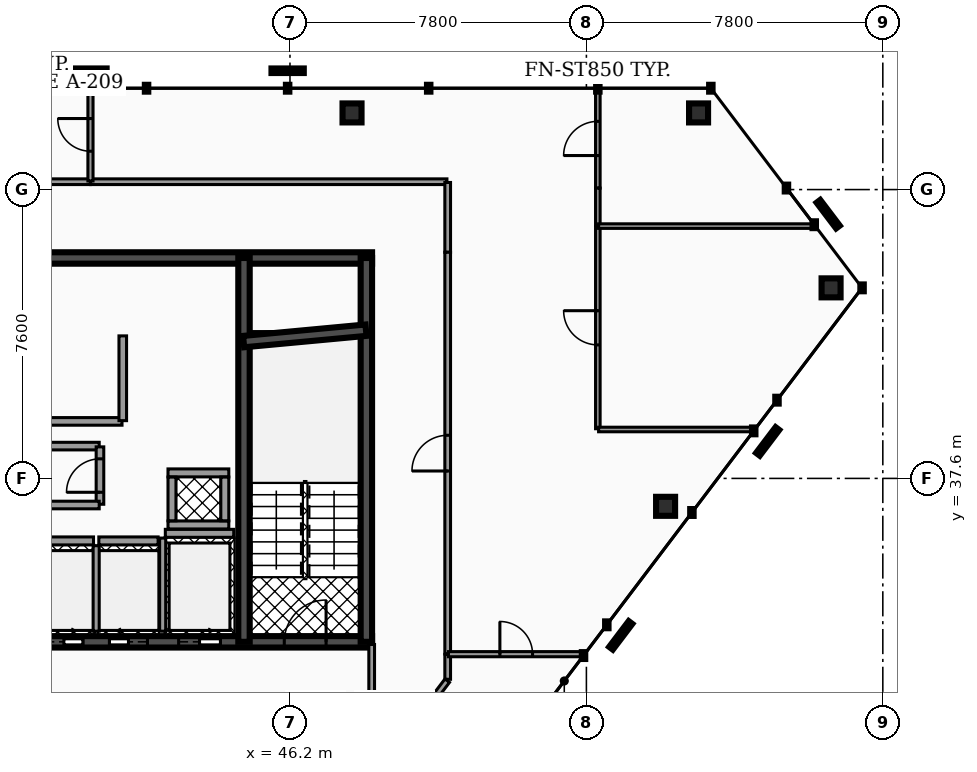
"""IFC4 building model, lengths in metres.
Left out: names, types, materials, properties, quantities, classifications, styles, units other than length and angle.
Written with IfcOpenShell. Run it as: python <this file> out.ifc"""

import sys

from ifc_helpers import new_model, si_unit, direction, frame, frame_2d, origin, origin_2d, place, context, subcontext, project, spatial, rectangle, hollow_rectangle, extrude, element, fill, save


model = new_model("IFC4")
c1 = context("Model", 3, precision=1e-05, world=origin(), true_north=direction((0.0, 1.0)))
c2 = subcontext(c1, "Body", "Model", "MODEL_VIEW")
j1 = project(units=[si_unit("LENGTHUNIT", "METRE"), si_unit("PLANEANGLEUNIT", "RADIAN")], contexts=[c1])
p1 = place(None, origin())
s1 = spatial("IfcSite", under=j1, at=p1, CompositionType="ELEMENT")
p2 = place(p1, origin())
s2 = spatial("IfcBuilding", under=s1, at=p2, CompositionType="ELEMENT")
p3 = place(p2, frame((0.0, 0.0, 265.2)))
s3 = spatial("IfcBuildingStorey", under=s2, at=p3, CompositionType="ELEMENT", Elevation=265.2)
p4 = place(p3, frame((28.5, 43.4, 0.0), z_axis=(0.0, 0.0, 1.0), x_axis=(1.0, 0.0, 0.0)))
e1 = element("IfcWall", 1, at=p4, inside=s3, PredefinedType="SHEAR", context=c2, shape_type="SweptSolid", body=[
    extrude(rectangle(XDim=19.86, YDim=0.3, at=frame_2d((9.93, 0.0))), origin(), (0.0, 0.0, 1.0), 3.18),
])
p5 = place(p3, frame((28.5, 33.3, 0.0), z_axis=(0.0, 0.0, 1.0), x_axis=(1.0, 0.0, 0.0)))
e2 = element("IfcWall", 2, at=p5, inside=s3, PredefinedType="SHEAR", context=c2, shape_type="SweptSolid", body=[
    extrude(rectangle(XDim=19.86, YDim=0.3, at=frame_2d((9.93, 0.0))), origin(), (0.0, 0.0, 1.0), 3.18),
])
p6 = place(p5, frame((3.93, 0.0, 0.0)))
e3 = element("IfcOpeningElement", 3, at=p6, cuts=e2, PredefinedType="OPENING", context=c2, shape_type="SweptSolid", body=[
    extrude(rectangle(XDim=1.1, YDim=2.15, at=frame_2d((0.55, 1.075))), frame((0.0, 0.16, 0.0), z_axis=(0.0, -1.0, 0.0), x_axis=(1.0, 0.0, 0.0)), (0.0, 0.0, 1.0), 0.32),
])
p7 = place(p5, frame((14.77, 0.0, 0.0)))
e4 = element("IfcOpeningElement", 4, at=p7, cuts=e2, PredefinedType="OPENING", context=c2, shape_type="SweptSolid", body=[
    extrude(rectangle(XDim=1.1, YDim=2.15, at=frame_2d((0.55, 1.075))), frame((0.0, 0.16, 0.0), z_axis=(0.0, -1.0, 0.0), x_axis=(1.0, 0.0, 0.0)), (0.0, 0.0, 1.0), 0.32),
])
p8 = place(p5, frame((11.25, 0.0, 0.0)))
e5 = element("IfcOpeningElement", 5, at=p8, cuts=e2, PredefinedType="OPENING", context=c2, shape_type="SweptSolid", body=[
    extrude(rectangle(XDim=1.0, YDim=2.1, at=frame_2d((0.5, 1.05))), frame((0.0, 0.16, 0.0), z_axis=(0.0, -1.0, 0.0), x_axis=(1.0, 0.0, 0.0)), (0.0, 0.0, 1.0), 0.32),
])
p9 = place(p5, frame((12.95, 0.0, 0.0)))
e6 = element("IfcOpeningElement", 6, at=p9, cuts=e2, PredefinedType="OPENING", context=c2, shape_type="SweptSolid", body=[
    extrude(rectangle(XDim=1.0, YDim=2.1, at=frame_2d((0.5, 1.05))), frame((0.0, 0.16, 0.0), z_axis=(0.0, -1.0, 0.0), x_axis=(1.0, 0.0, 0.0)), (0.0, 0.0, 1.0), 0.32),
])
p10 = place(p5, frame((5.85, 0.0, 0.0)))
e7 = element("IfcOpeningElement", 7, at=p10, cuts=e2, PredefinedType="OPENING", context=c2, shape_type="SweptSolid", body=[
    extrude(rectangle(XDim=1.0, YDim=2.1, at=frame_2d((0.5, 1.05))), frame((0.0, 0.16, 0.0), z_axis=(0.0, -1.0, 0.0), x_axis=(1.0, 0.0, 0.0)), (0.0, 0.0, 1.0), 0.32),
])
p11 = place(p5, frame((1.21, 0.0, 0.0)))
e8 = element("IfcOpeningElement", 8, at=p11, cuts=e2, PredefinedType="OPENING", context=c2, shape_type="SweptSolid", body=[
    extrude(rectangle(XDim=1.1, YDim=2.2, at=frame_2d((0.55, 1.1))), frame((0.0, 0.16, 0.0), z_axis=(0.0, -1.0, 0.0), x_axis=(1.0, 0.0, 0.0)), (0.0, 0.0, 1.0), 0.32),
])
p12 = place(p5, frame((9.34, 0.0, 0.0)))
e9 = element("IfcOpeningElement", 9, at=p12, cuts=e2, PredefinedType="OPENING", context=c2, shape_type="SweptSolid", body=[
    extrude(rectangle(XDim=1.12, YDim=2.05, at=frame_2d((0.56, 1.025))), frame((0.0, 0.16, 0.0), z_axis=(0.0, -1.0, 0.0), x_axis=(1.0, 0.0, 0.0)), (0.0, 0.0, 1.0), 0.32),
])
p13 = place(p5, frame((17.55, 0.0, 0.0)))
e10 = element("IfcOpeningElement", 10, at=p13, cuts=e2, PredefinedType="OPENING", context=c2, shape_type="SweptSolid", body=[
    extrude(rectangle(XDim=1.1, YDim=2.2, at=frame_2d((0.55, 1.1))), frame((0.0, 0.16, 0.0), z_axis=(0.0, -1.0, 0.0), x_axis=(1.0, 0.0, 0.0)), (0.0, 0.0, 1.0), 0.32),
])
for number, where, z_axis, x_axis in (
    (11, (44.99, 33.3, 0.0), (0.0, 0.0, 1.0), (0.0, 1.0, 0.0)),
    (12, (48.21, 33.3, 0.0), (0.0, 0.0, 1.0), (0.0, 1.0, 0.0)),
):
    element("IfcWall", number, at=place(p3, frame(where, z_axis=z_axis, x_axis=x_axis)), inside=s3, PredefinedType="SHEAR", context=c2, shape_type="SweptSolid", body=[
        extrude(rectangle(XDim=10.1, YDim=0.3, at=frame_2d((5.05, 0.0))), origin(), (0.0, 0.0, 1.0), 3.18),
    ])
p14 = place(p3, frame((44.98, 41.2, 0.0), z_axis=(0.0, 0.0, 1.0), x_axis=(0.995686468965, 0.09278176286, 0.0)))
e13 = element("IfcWall", 13, at=p14, inside=s3, PredefinedType="SHEAR", context=c2, shape_type="SweptSolid", body=[
    extrude(rectangle(XDim=3.234, YDim=0.3, at=frame_2d((1.617, 0.0))), origin(), (0.0, 0.0, 1.0), 3.18),
])
p15 = place(p3, frame((56.952, 47.217, 0.0), z_axis=(-0.046444439461, -0.036634392842, 0.998248884449), x_axis=(0.619308165543, -0.785148009035, 0.0)))
e14 = element("IfcColumn", 14, at=p15, inside=s3, PredefinedType="COLUMN", context=c2, shape_type="SweptSolid", body=[
    extrude(hollow_rectangle(XDim=0.5, YDim=0.5, WallThickness=0.025, at=origin_2d()), origin(), (0.0, 0.0, 1.0), 3.186),
])
p16 = place(p3, frame((47.833, 47.217, 0.0), z_axis=(-0.048126704161, -0.036631472275, 0.998169302065), x_axis=(0.605661387148, -0.795722491902, 0.0)))
e15 = element("IfcColumn", 15, at=p16, inside=s3, PredefinedType="COLUMN", context=c2, shape_type="SweptSolid", body=[
    extrude(hollow_rectangle(XDim=0.5, YDim=0.5, WallThickness=0.025, at=origin_2d()), origin(), (0.0, 0.0, 1.0), 3.186),
])
p17 = place(p3, frame((56.084, 36.866, 0.0), z_axis=(-0.147024502141, 0.113908157123, 0.982552150021), x_axis=(-0.612451293776, -0.790508325543, 0.0)))
e16 = element("IfcColumn", 16, at=p17, inside=s3, PredefinedType="COLUMN", context=c2, shape_type="SweptSolid", body=[
    extrude(hollow_rectangle(XDim=0.5, YDim=0.5, WallThickness=0.025, at=origin_2d()), origin(), (0.0, 0.0, 1.0), 3.236),
])
p18 = place(p3, frame((60.438, 42.614, 0.0), z_axis=(-0.153152996189, 0.108888688575, 0.982185019871), x_axis=(-0.579452714021, -0.815005860233, 0.0)))
e17 = element("IfcColumn", 17, at=p18, inside=s3, PredefinedType="COLUMN", context=c2, shape_type="SweptSolid", body=[
    extrude(hollow_rectangle(XDim=0.5, YDim=0.5, WallThickness=0.025, at=origin_2d()), origin(), (0.0, 0.0, 1.0), 3.238),
])
p19 = place(p3, frame((42.92, 36.155, 0.0), z_axis=(0.0, 0.0, 1.0), x_axis=(1.0, 0.0, 0.0)))
e18 = element("IfcWall", 18, at=p19, inside=s3, PredefinedType="SOLIDWALL", context=c2, shape_type="SweptSolid", body=[
    extrude(rectangle(XDim=1.8, YDim=0.21, at=frame_2d((0.9, 0.0))), origin(), (0.0, 0.0, 1.0), 3.18),
])
p20 = place(p3, frame((42.85, 33.58, 0.0), z_axis=(0.0, 0.0, 1.0), x_axis=(0.0, 1.0, 0.0)))
e19 = element("IfcWall", 19, at=p20, inside=s3, PredefinedType="SOLIDWALL", context=c2, shape_type="SweptSolid", body=[
    extrude(rectangle(XDim=2.45, YDim=0.16, at=frame_2d((1.225, 0.0))), origin(), (0.0, 0.0, 1.0), 3.18),
])
p21 = place(p3, frame((39.47, 35.955, 0.0), z_axis=(0.0, 0.0, 1.0), x_axis=(1.0, 0.0, 0.0)))
e20 = element("IfcWall", 20, at=p21, inside=s3, PredefinedType="SOLIDWALL", context=c2, shape_type="SweptSolid", body=[
    extrude(rectangle(XDim=1.56, YDim=0.21, at=frame_2d((0.78, 0.0))), origin(), (0.0, 0.0, 1.0), 3.18),
])
p22 = place(p3, frame((41.1, 33.58, 0.0), z_axis=(0.0, 0.0, 1.0), x_axis=(0.0, 1.0, 0.0)))
e21 = element("IfcWall", 21, at=p22, inside=s3, PredefinedType="SOLIDWALL", context=c2, shape_type="SweptSolid", body=[
    extrude(rectangle(XDim=2.25, YDim=0.16, at=frame_2d((1.125, 0.0))), origin(), (0.0, 0.0, 1.0), 3.18),
])
p23 = place(p3, frame((41.17, 35.955, 0.0), z_axis=(0.0, 0.0, 1.0), x_axis=(1.0, 0.0, 0.0)))
e22 = element("IfcWall", 22, at=p23, inside=s3, PredefinedType="SOLIDWALL", context=c2, shape_type="SweptSolid", body=[
    extrude(rectangle(XDim=1.56, YDim=0.21, at=frame_2d((0.78, 0.0))), origin(), (0.0, 0.0, 1.0), 3.18),
])
for number, where, z_axis, x_axis in (
    (23, (42.99, 36.375, 0.0), (0.0, 0.0, 1.0), (1.0, 0.0, 0.0)),
    (24, (42.99, 37.745, 0.0), (0.0, 0.0, 1.0), (1.0, 0.0, 0.0)),
):
    element("IfcWall", number, at=place(p3, frame(where, z_axis=z_axis, x_axis=x_axis)), inside=s3, PredefinedType="SOLIDWALL", context=c2, shape_type="SweptSolid", body=[
        extrude(rectangle(XDim=1.6, YDim=0.21, at=frame_2d((0.8, 0.0))), origin(), (0.0, 0.0, 1.0), 3.18),
    ])
for number, where, z_axis, x_axis in (
    (25, (43.095, 36.485, 0.0), (0.0, 0.0, 1.0), (0.0, 1.0, 0.0)),
    (26, (44.485, 36.485, 0.0), (0.0, 0.0, 1.0), (0.0, 1.0, 0.0)),
):
    element("IfcWall", number, at=place(p3, frame(where, z_axis=z_axis, x_axis=x_axis)), inside=s3, PredefinedType="SOLIDWALL", context=c2, shape_type="SweptSolid", body=[
        extrude(rectangle(XDim=1.15, YDim=0.21, at=frame_2d((0.575, 0.0))), origin(), (0.0, 0.0, 1.0), 3.18),
    ])
p24 = place(p3, frame((39.27, 38.45, 0.0), z_axis=(0.0, 0.0, 1.0), x_axis=(1.0, 0.0, 0.0)))
e27 = element("IfcWall", 27, at=p24, inside=s3, PredefinedType="PARTITIONING", context=c2, shape_type="SweptSolid", body=[
    extrude(rectangle(XDim=1.91, YDim=0.2, at=frame_2d((0.955, 0.0))), origin(), (0.0, 0.0, 1.0), 2.235),
])
p25 = place(p3, frame((41.2, 36.92, 0.0), z_axis=(0.0, 0.0, 1.0), x_axis=(0.0, 1.0, 0.0)))
e28 = element("IfcWall", 28, at=p25, inside=s3, PredefinedType="PARTITIONING", context=c2, shape_type="SweptSolid", body=[
    extrude(rectangle(XDim=1.51, YDim=0.2, at=frame_2d((0.755, 0.0))), origin(), (0.0, 0.0, 1.0), 2.235),
])
p26 = place(p25, frame((0.315, 0.0, 0.0)))
e29 = element("IfcOpeningElement", 29, at=p26, cuts=e28, PredefinedType="OPENING", context=c2, shape_type="SweptSolid", body=[
    extrude(rectangle(XDim=0.88, YDim=2.05, at=frame_2d((0.44, 1.025))), frame((0.0, 0.11, 0.0), z_axis=(0.0, -1.0, 0.0), x_axis=(1.0, 0.0, 0.0)), (0.0, 0.0, 1.0), 0.22),
])
p27 = place(p3, frame((39.27, 36.9, 0.0), z_axis=(0.0, 0.0, 1.0), x_axis=(1.0, 0.0, 0.0)))
e30 = element("IfcWall", 30, at=p27, inside=s3, PredefinedType="PARTITIONING", context=c2, shape_type="SweptSolid", body=[
    extrude(rectangle(XDim=1.91, YDim=0.2, at=frame_2d((0.955, 0.0))), origin(), (0.0, 0.0, 1.0), 2.235),
])
p28 = place(p3, frame((39.27, 39.1, 0.0), z_axis=(0.0, 0.0, 1.0), x_axis=(1.0, 0.0, 0.0)))
e31 = element("IfcWall", 31, at=p28, inside=s3, PredefinedType="PARTITIONING", context=c2, shape_type="SweptSolid", body=[
    extrude(rectangle(XDim=2.51, YDim=0.2, at=frame_2d((1.255, 0.0))), origin(), (0.0, 0.0, 1.0), 2.235),
])
p29 = place(p3, frame((41.8, 39.12, 0.0), z_axis=(0.0, 0.0, 1.0), x_axis=(0.0, 1.0, 0.0)))
e32 = element("IfcWall", 32, at=p29, inside=s3, PredefinedType="PARTITIONING", context=c2, shape_type="SweptSolid", body=[
    extrude(rectangle(XDim=2.23, YDim=0.2, at=frame_2d((1.115, 0.0))), origin(), (0.0, 0.0, 1.0), 2.235),
])
p30 = place(p3, frame((48.35, 30.17, 0.0), z_axis=(0.0, 0.0, 1.0), x_axis=(0.0, 1.0, 0.0)))
e33 = element("IfcWall", 33, at=p30, inside=s3, PredefinedType="PARTITIONING", context=c2, shape_type="SweptSolid", body=[
    extrude(rectangle(XDim=3.06, YDim=0.15, at=frame_2d((1.53, 0.0))), origin(), (0.0, 0.0, 1.0), 2.235),
])
p31 = place(p3, frame((40.955, 45.407, 0.0), z_axis=(0.0, 0.0, 1.0), x_axis=(1.0, 0.0, 0.0)))
e34 = element("IfcWall", 34, at=p31, inside=s3, PredefinedType="PARTITIONING", context=c2, shape_type="SweptSolid", body=[
    extrude(rectangle(XDim=9.375, YDim=0.15, at=frame_2d((4.688, 0.0))), origin(), (0.0, 0.0, 1.0), 2.235),
])
p32 = place(p3, frame((50.35, 43.55, 0.0), z_axis=(0.0, 0.0, 1.0), x_axis=(0.0, 1.0, 0.0)))
e35 = element("IfcWall", 35, at=p32, inside=s3, PredefinedType="PARTITIONING", context=c2, shape_type="SweptSolid", body=[
    extrude(rectangle(XDim=1.837, YDim=0.15, at=frame_2d((0.918, 0.0))), origin(), (0.0, 0.0, 1.0), 2.235),
])
p33 = place(p3, frame((50.35, 32.98, 0.0), z_axis=(0.0, 0.0, 1.0), x_axis=(0.0, 1.0, 0.0)))
e36 = element("IfcWall", 36, at=p33, inside=s3, PredefinedType="PARTITIONING", context=c2, shape_type="SweptSolid", body=[
    extrude(rectangle(XDim=10.57, YDim=0.15, at=frame_2d((5.285, 0.0))), origin(), (0.0, 0.0, 1.0), 2.235),
])
p34 = place(p33, frame((4.815, 0.0, 0.0)))
e37 = element("IfcOpeningElement", 37, at=p34, cuts=e36, PredefinedType="OPENING", context=c2, shape_type="SweptSolid", body=[
    extrude(rectangle(XDim=0.94, YDim=2.05, at=frame_2d((0.47, 1.025))), frame((0.0, 0.085, 0.0), z_axis=(0.0, -1.0, 0.0), x_axis=(1.0, 0.0, 0.0)), (0.0, 0.0, 1.0), 0.17),
])
p35 = place(p3, frame((50.35, 32.314, 0.0), z_axis=(0.0, 0.0, 1.0), x_axis=(0.0, 1.0, 0.0)))
e38 = element("IfcWall", 38, at=p35, inside=s3, PredefinedType="PARTITIONING", context=c2, shape_type="SweptSolid", body=[
    extrude(rectangle(XDim=0.656, YDim=0.15, at=frame_2d((0.328, 0.0))), origin(), (0.0, 0.0, 1.0), 2.235),
])
p36 = place(p3, frame((48.738, 30.166, 0.0), z_axis=(0.0, 0.0, 1.0), x_axis=(0.603839951985, 0.797105584215, 0.0)))
e39 = element("IfcWall", 39, at=p36, inside=s3, PredefinedType="PARTITIONING", context=c2, shape_type="SweptSolid", body=[
    extrude(rectangle(XDim=2.65, YDim=0.15, at=frame_2d((1.325, 0.0))), origin(), (0.0, 0.0, 1.0), 2.235),
])
p37 = place(p3, frame((38.405, 45.407, 0.0), z_axis=(0.0, 0.0, 1.0), x_axis=(1.0, 0.0, 0.0)))
e40 = element("IfcWall", 40, at=p37, inside=s3, PredefinedType="PARTITIONING", context=c2, shape_type="SweptSolid", body=[
    extrude(rectangle(XDim=2.54, YDim=0.15, at=frame_2d((1.27, 0.0))), origin(), (0.0, 0.0, 1.0), 2.235),
])
p38 = place(p3, frame((50.37, 32.975, 0.0), z_axis=(0.0, 0.0, 1.0), x_axis=(1.0, 0.0, 0.0)))
e41 = element("IfcWall", 41, at=p38, inside=s3, PredefinedType="PARTITIONING", context=c2, shape_type="SweptSolid", body=[
    extrude(rectangle(XDim=3.567, YDim=0.135, at=frame_2d((1.783, 0.0))), origin(), (0.0, 0.0, 1.0), 2.235),
])
p39 = place(p38, frame((1.354, 0.0, 0.0)))
e42 = element("IfcOpeningElement", 42, at=p39, cuts=e41, PredefinedType="OPENING", context=c2, shape_type="SweptSolid", body=[
    extrude(rectangle(XDim=0.86, YDim=2.05, at=frame_2d((0.43, 1.025))), frame((0.0, 0.077, 0.0), z_axis=(0.0, -1.0, 0.0), x_axis=(1.0, 0.0, 0.0)), (0.0, 0.0, 1.0), 0.155),
])
p40 = place(p3, frame((40.95, 45.427, 0.0), z_axis=(0.0, 0.0, 1.0), x_axis=(0.0, 1.0, 0.0)))
e43 = element("IfcWall", 43, at=p40, inside=s3, PredefinedType="PARTITIONING", context=c2, shape_type="SweptSolid", body=[
    extrude(rectangle(XDim=2.425, YDim=0.135, at=frame_2d((1.212, 0.0))), origin(), (0.0, 0.0, 1.0), 2.235),
])
p41 = place(p40, frame((0.782, 0.0, 0.0)))
e44 = element("IfcOpeningElement", 44, at=p41, cuts=e43, PredefinedType="OPENING", context=c2, shape_type="SweptSolid", body=[
    extrude(rectangle(XDim=0.86, YDim=2.05, at=frame_2d((0.43, 1.025))), frame((0.0, 0.077, 0.0), z_axis=(0.0, -1.0, 0.0), x_axis=(1.0, 0.0, 0.0)), (0.0, 0.0, 1.0), 0.155),
])
p42 = place(p3, frame((54.301, 45.239, 0.0), z_axis=(0.0, 0.0, 1.0), x_axis=(0.0, 1.0, 0.0)))
e45 = element("IfcWall", 45, at=p42, inside=s3, PredefinedType="PARTITIONING", context=c2, shape_type="SweptSolid", body=[
    extrude(rectangle(XDim=2.613, YDim=0.12, at=frame_2d((1.307, 0.0))), origin(), (0.0, 0.0, 1.0), 2.235),
])
p43 = place(p42, frame((0.856, 0.0, 0.0)))
e46 = element("IfcOpeningElement", 46, at=p43, cuts=e45, PredefinedType="OPENING", context=c2, shape_type="SweptSolid", body=[
    extrude(rectangle(XDim=0.9, YDim=2.05, at=frame_2d((0.45, 1.025))), frame((0.0, 0.07, 0.0), z_axis=(0.0, -1.0, 0.0), x_axis=(1.0, 0.0, 0.0)), (0.0, 0.0, 1.0), 0.14),
])
p44 = place(p3, frame((54.301, 44.259, 0.0), z_axis=(0.0, 0.0, 1.0), x_axis=(0.0, 1.0, 0.0)))
e47 = element("IfcWall", 47, at=p44, inside=s3, PredefinedType="PARTITIONING", context=c2, shape_type="SweptSolid", body=[
    extrude(rectangle(XDim=0.98, YDim=0.12, at=frame_2d((0.49, 0.0))), origin(), (0.0, 0.0, 1.0), 2.235),
])
p45 = place(p3, frame((54.301, 38.907, 0.0), z_axis=(0.0, 0.0, 1.0), x_axis=(0.0, 1.0, 0.0)))
e48 = element("IfcWall", 48, at=p45, inside=s3, PredefinedType="PARTITIONING", context=c2, shape_type="SweptSolid", body=[
    extrude(rectangle(XDim=5.312, YDim=0.12, at=frame_2d((2.656, 0.0))), origin(), (0.0, 0.0, 1.0), 2.235),
])
p46 = place(p45, frame((2.206, 0.0, 0.0)))
e49 = element("IfcOpeningElement", 49, at=p46, cuts=e48, PredefinedType="OPENING", context=c2, shape_type="SweptSolid", body=[
    extrude(rectangle(XDim=0.9, YDim=2.05, at=frame_2d((0.45, 1.025))), frame((0.0, 0.07, 0.0), z_axis=(0.0, -1.0, 0.0), x_axis=(1.0, 0.0, 0.0)), (0.0, 0.0, 1.0), 0.14),
])
p47 = place(p3, frame((54.321, 38.887, 0.0), z_axis=(0.0, 0.0, 1.0), x_axis=(1.0, 0.0, 0.0)))
e50 = element("IfcWall", 50, at=p47, inside=s3, PredefinedType="PARTITIONING", context=c2, shape_type="SweptSolid", body=[
    extrude(rectangle(XDim=4.095, YDim=0.12, at=frame_2d((2.047, 0.0))), origin(), (0.0, 0.0, 1.0), 2.235),
])
p48 = place(p3, frame((54.321, 44.239, 0.0), z_axis=(0.0, 0.0, 1.0), x_axis=(1.0, 0.0, 0.0)))
e51 = element("IfcWall", 51, at=p48, inside=s3, PredefinedType="PARTITIONING", context=c2, shape_type="SweptSolid", body=[
    extrude(rectangle(XDim=5.687, YDim=0.12, at=frame_2d((2.844, 0.0))), origin(), (0.0, 0.0, 1.0), 2.235),
])
p49 = place(p7, origin())
e52 = element("IfcDoor", 52, at=p49, inside=s3, OperationType="SLIDING_TO_RIGHT", PredefinedType="DOOR", context=c2, shape_type="SweptSolid", body=[
    extrude(rectangle(XDim=1.1, YDim=2.15, at=frame_2d((0.55, 1.075))), frame((0.0, 0.025, 0.0), z_axis=(0.0, -1.0, 0.0), x_axis=(1.0, 0.0, 0.0)), (0.0, 0.0, 1.0), 0.05),
])
fill(e4, e52)
p50 = place(p8, origin())
e53 = element("IfcDoor", 53, at=p50, inside=s3, OperationType="SLIDING_TO_RIGHT", PredefinedType="DOOR", context=c2, shape_type="SweptSolid", body=[
    extrude(rectangle(XDim=1.0, YDim=2.1, at=frame_2d((0.5, 1.05))), frame((0.0, 0.025, 0.0), z_axis=(0.0, -1.0, 0.0), x_axis=(1.0, 0.0, 0.0)), (0.0, 0.0, 1.0), 0.05),
])
fill(e5, e53)
p51 = place(p9, origin())
e54 = element("IfcDoor", 54, at=p51, inside=s3, OperationType="SLIDING_TO_LEFT", PredefinedType="DOOR", context=c2, shape_type="SweptSolid", body=[
    extrude(rectangle(XDim=1.0, YDim=2.1, at=frame_2d((0.5, 1.05))), frame((0.0, 0.025, 0.0), z_axis=(0.0, -1.0, 0.0), x_axis=(1.0, 0.0, 0.0)), (0.0, 0.0, 1.0), 0.05),
])
fill(e6, e54)
p52 = place(p13, origin())
e55 = element("IfcDoor", 55, at=p52, inside=s3, OperationType="SINGLE_SWING_RIGHT", PredefinedType="DOOR", context=c2, shape_type="SweptSolid", body=[
    extrude(rectangle(XDim=1.1, YDim=2.2, at=frame_2d((0.55, 1.1))), frame((0.0, 0.025, 0.0), z_axis=(0.0, -1.0, 0.0), x_axis=(1.0, 0.0, 0.0)), (0.0, 0.0, 1.0), 0.05),
])
fill(e10, e55)
p53 = place(p26, origin())
e56 = element("IfcDoor", 56, at=p53, inside=s3, OperationType="SINGLE_SWING_LEFT", PredefinedType="DOOR", context=c2, shape_type="SweptSolid", body=[
    extrude(rectangle(XDim=0.88, YDim=2.05, at=frame_2d((0.44, 1.025))), frame((0.0, 0.025, 0.0), z_axis=(0.0, -1.0, 0.0), x_axis=(1.0, 0.0, 0.0)), (0.0, 0.0, 1.0), 0.05),
])
fill(e29, e56)
p54 = place(p34, origin())
e57 = element("IfcDoor", 57, at=p54, inside=s3, OperationType="SINGLE_SWING_LEFT", PredefinedType="DOOR", context=c2, shape_type="SweptSolid", body=[
    extrude(rectangle(XDim=0.94, YDim=2.05, at=frame_2d((0.47, 1.025))), frame((0.0, 0.025, 0.0), z_axis=(0.0, -1.0, 0.0), x_axis=(1.0, 0.0, 0.0)), (0.0, 0.0, 1.0), 0.05),
])
fill(e37, e57)
p55 = place(p39, origin())
e58 = element("IfcDoor", 58, at=p55, inside=s3, OperationType="SINGLE_SWING_LEFT", PredefinedType="DOOR", context=c2, shape_type="SweptSolid", body=[
    extrude(rectangle(XDim=0.86, YDim=2.05, at=frame_2d((0.43, 1.025))), frame((0.0, 0.025, 0.0), z_axis=(0.0, -1.0, 0.0), x_axis=(1.0, 0.0, 0.0)), (0.0, 0.0, 1.0), 0.05),
])
fill(e42, e58)
p56 = place(p41, origin())
e59 = element("IfcDoor", 59, at=p56, inside=s3, OperationType="SINGLE_SWING_RIGHT", PredefinedType="DOOR", context=c2, shape_type="SweptSolid", body=[
    extrude(rectangle(XDim=0.86, YDim=2.05, at=frame_2d((0.43, 1.025))), frame((0.0, 0.025, 0.0), z_axis=(0.0, -1.0, 0.0), x_axis=(1.0, 0.0, 0.0)), (0.0, 0.0, 1.0), 0.05),
])
fill(e44, e59)
p57 = place(p43, origin())
e60 = element("IfcDoor", 60, at=p57, inside=s3, OperationType="SINGLE_SWING_LEFT", PredefinedType="DOOR", context=c2, shape_type="SweptSolid", body=[
    extrude(rectangle(XDim=0.9, YDim=2.05, at=frame_2d((0.45, 1.025))), frame((0.0, 0.025, 0.0), z_axis=(0.0, -1.0, 0.0), x_axis=(1.0, 0.0, 0.0)), (0.0, 0.0, 1.0), 0.05),
])
fill(e46, e60)
p58 = place(p46, origin())
e61 = element("IfcDoor", 61, at=p58, inside=s3, OperationType="SINGLE_SWING_RIGHT", PredefinedType="DOOR", context=c2, shape_type="SweptSolid", body=[
    extrude(rectangle(XDim=0.9, YDim=2.05, at=frame_2d((0.45, 1.025))), frame((0.0, 0.025, 0.0), z_axis=(0.0, -1.0, 0.0), x_axis=(1.0, 0.0, 0.0)), (0.0, 0.0, 1.0), 0.05),
])
fill(e49, e61)
save(model, sys.argv[1])
